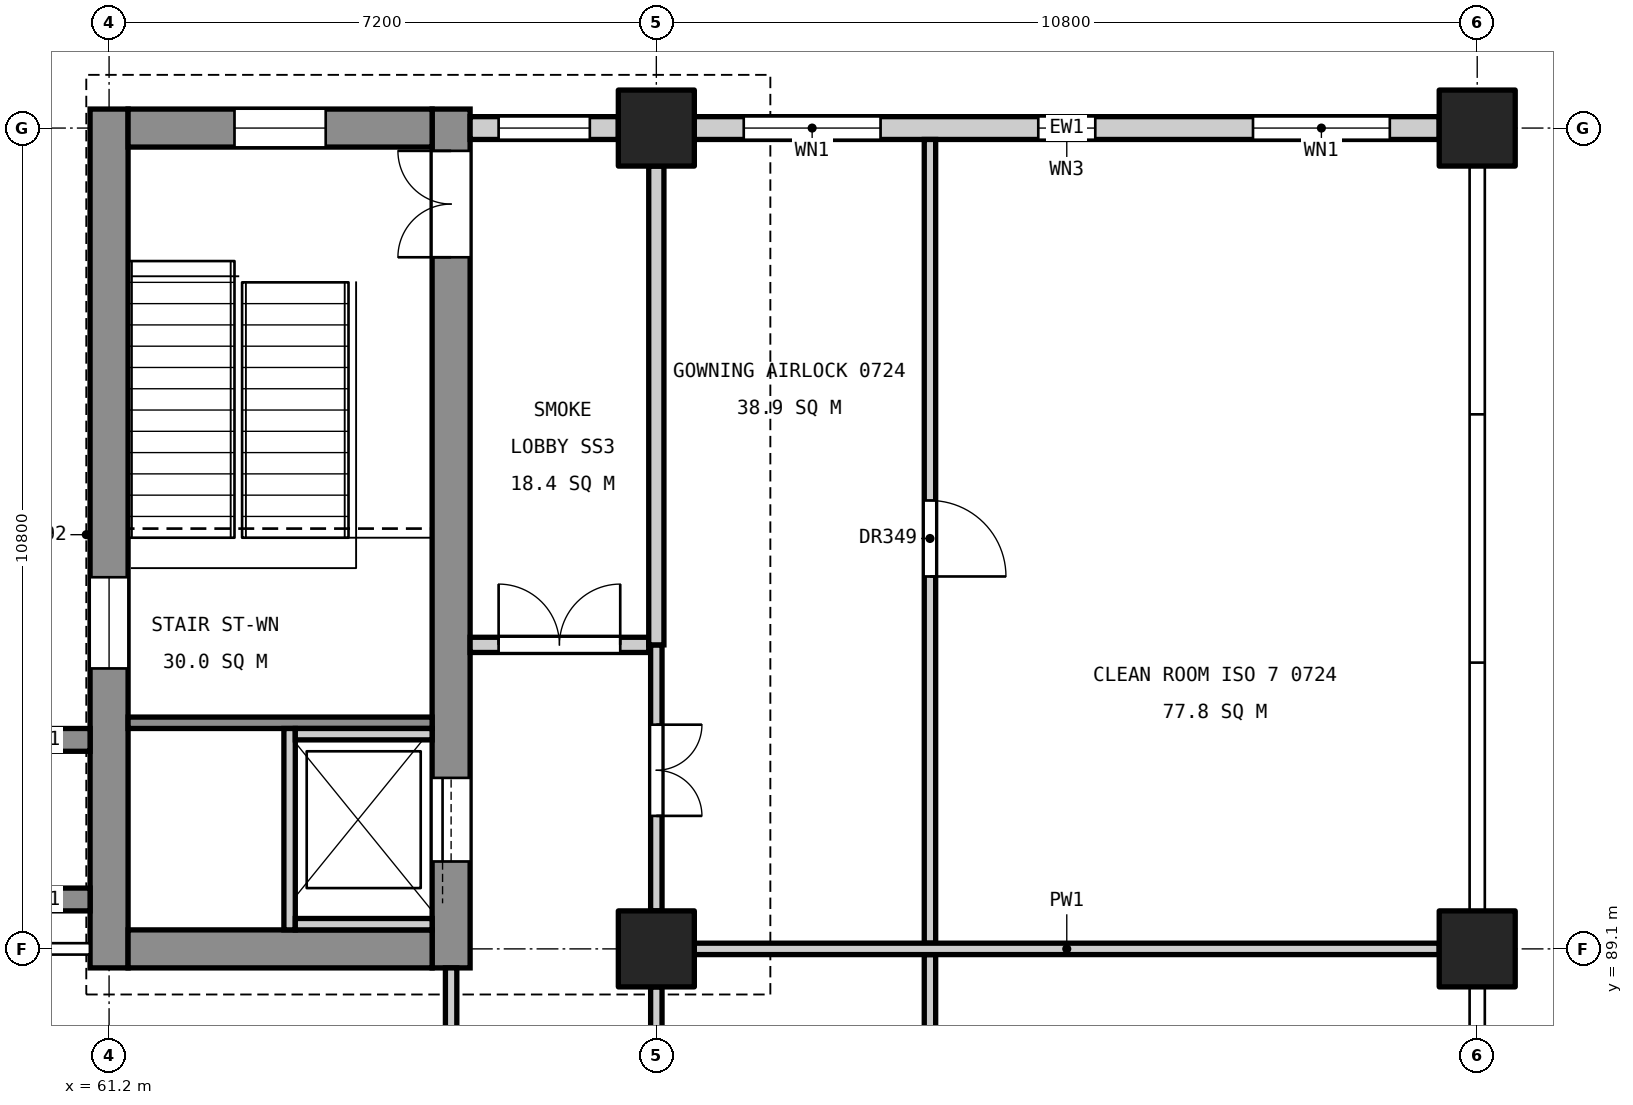
"""IFC4 building model, lengths in metres.
Left out: names, types, materials, properties, quantities, classifications, styles, units other than length and angle.
Written with IfcOpenShell. Run it as: python <this file> out.ifc"""

import sys

from ifc_helpers import new_model, si_unit, direction, frame, frame_2d, origin, origin_2d, place, context, subcontext, project, spatial, rectangle, extrude, element, fill, save


model = new_model("IFC4")
c1 = context("Model", 3, precision=1e-05, world=origin(), true_north=direction((0.0, 1.0)))
c2 = subcontext(c1, "Body", "Model", "MODEL_VIEW")
j1 = project(units=[si_unit("LENGTHUNIT", "METRE"), si_unit("PLANEANGLEUNIT", "RADIAN")], contexts=[c1])
p1 = place(None, origin())
s1 = spatial("IfcSite", under=j1, at=p1, CompositionType="ELEMENT")
p2 = place(p1, origin())
s2 = spatial("IfcBuilding", under=s1, at=p2, CompositionType="ELEMENT")
p3 = place(p2, frame((0.0, 0.0, 36.6)))
s3 = spatial("IfcBuildingStorey", under=s2, at=p3, CompositionType="ELEMENT", Elevation=36.6)
for number, where, z_axis, x_axis in (
    (1, (68.4, 89.1, 0.0), (0.0, 0.0, 1.0), (1.0, 0.0, 0.0)),
    (2, (68.4, 99.9, 0.0), (0.0, 0.0, 1.0), (1.0, 0.0, 0.0)),
    (3, (79.2, 89.1, 0.0), (0.0, 0.0, 1.0), (1.0, 0.0, 0.0)),
    (4, (79.2, 99.9, 0.0), (0.0, 0.0, 1.0), (1.0, 0.0, 0.0)),
):
    element("IfcColumn", number, at=place(p3, frame(where, z_axis=z_axis, x_axis=x_axis)), inside=s3, PredefinedType="COLUMN", context=c2, shape_type="SweptSolid", body=[
        extrude(rectangle(XDim=1.0, YDim=1.0, at=origin_2d()), origin(), (0.0, 0.0, 1.0), 4.8),
    ])
p4 = place(p3, frame((61.2, 88.85, 0.0), z_axis=(0.0, 0.0, 1.0), x_axis=(0.0, 1.0, 0.0)))
e5 = element("IfcWall", 5, at=p4, inside=s3, PredefinedType="SHEAR", context=c2, shape_type="SweptSolid", body=[
    extrude(rectangle(XDim=11.3, YDim=0.5, at=frame_2d((5.65, 0.0))), origin(), (0.0, 0.0, 1.0), 4.55),
])
p5 = place(p4, frame((3.94, 0.0, 3.4)))
e6 = element("IfcOpeningElement", 6, at=p5, cuts=e5, PredefinedType="OPENING", context=c2, shape_type="SweptSolid", body=[
    extrude(rectangle(XDim=1.2, YDim=0.9, at=frame_2d((0.6, 0.45))), frame((0.0, 0.26, 0.0), z_axis=(0.0, -1.0, 0.0), x_axis=(1.0, 0.0, 0.0)), (0.0, 0.0, 1.0), 0.52),
])
p6 = place(p3, frame((65.7, 88.85, 0.0), z_axis=(0.0, 0.0, 1.0), x_axis=(0.0, 1.0, 0.0)))
e7 = element("IfcWall", 7, at=p6, inside=s3, PredefinedType="SHEAR", context=c2, shape_type="SweptSolid", body=[
    extrude(rectangle(XDim=11.3, YDim=0.5, at=frame_2d((5.65, 0.0))), origin(), (0.0, 0.0, 1.0), 4.55),
])
p7 = place(p6, frame((9.35, 0.0, 0.0)))
e8 = element("IfcOpeningElement", 8, at=p7, cuts=e7, PredefinedType="OPENING", context=c2, shape_type="SweptSolid", body=[
    extrude(rectangle(XDim=1.4, YDim=2.1, at=frame_2d((0.7, 1.05))), frame((0.0, 0.26, 0.0), z_axis=(0.0, -1.0, 0.0), x_axis=(1.0, 0.0, 0.0)), (0.0, 0.0, 1.0), 0.52),
])
p8 = place(p6, frame((1.4, 0.0, 0.0)))
e9 = element("IfcOpeningElement", 9, at=p8, cuts=e7, PredefinedType="OPENING", context=c2, shape_type="SweptSolid", body=[
    extrude(rectangle(XDim=1.1, YDim=2.1, at=frame_2d((0.55, 1.05))), frame((0.0, 0.26, 0.0), z_axis=(0.0, -1.0, 0.0), x_axis=(1.0, 0.0, 0.0)), (0.0, 0.0, 1.0), 0.52),
])
p9 = place(p3, frame((61.45, 89.1, 0.0), z_axis=(0.0, 0.0, 1.0), x_axis=(1.0, 0.0, 0.0)))
e10 = element("IfcWall", 10, at=p9, inside=s3, PredefinedType="SHEAR", context=c2, shape_type="SweptSolid", body=[
    extrude(rectangle(XDim=4.0, YDim=0.5, at=frame_2d((2.0, 0.0))), origin(), (0.0, 0.0, 1.0), 4.55),
])
p10 = place(p3, frame((61.45, 99.9, 0.0), z_axis=(0.0, 0.0, 1.0), x_axis=(1.0, 0.0, 0.0)))
e11 = element("IfcWall", 11, at=p10, inside=s3, PredefinedType="SHEAR", context=c2, shape_type="SweptSolid", body=[
    extrude(rectangle(XDim=4.0, YDim=0.5, at=frame_2d((2.0, 0.0))), origin(), (0.0, 0.0, 1.0), 4.55),
])
p11 = place(p10, frame((1.4, 0.0, 3.4)))
e12 = element("IfcOpeningElement", 12, at=p11, cuts=e11, PredefinedType="OPENING", context=c2, shape_type="SweptSolid", body=[
    extrude(rectangle(XDim=1.2, YDim=0.9, at=frame_2d((0.6, 0.45))), frame((0.0, 0.26, 0.0), z_axis=(0.0, -1.0, 0.0), x_axis=(1.0, 0.0, 0.0)), (0.0, 0.0, 1.0), 0.52),
])
for number, where, z_axis, x_axis in (
    (13, (60.95, 89.75, 0.0), (0.0, 0.0, 1.0), (-1.0, 0.0, 0.0)),
    (14, (60.95, 91.85, 0.0), (0.0, 0.0, 1.0), (-1.0, 0.0, 0.0)),
):
    element("IfcWall", number, at=place(p3, frame(where, z_axis=z_axis, x_axis=x_axis)), inside=s3, PredefinedType="SHEAR", context=c2, shape_type="SweptSolid", body=[
        extrude(rectangle(XDim=1.25, YDim=0.3, at=frame_2d((0.625, 0.0))), origin(), (0.0, 0.0, 1.0), 4.8),
    ])
p12 = place(p3, frame((61.45, 92.075, 0.0), z_axis=(0.0, 0.0, 1.0), x_axis=(1.0, 0.0, 0.0)))
e15 = element("IfcWall", 15, at=p12, inside=s3, PredefinedType="SOLIDWALL", context=c2, shape_type="SweptSolid", body=[
    extrude(rectangle(XDim=4.0, YDim=0.15, at=frame_2d((2.0, 0.0))), origin(), (0.0, 0.0, 1.0), 4.55),
])
p13 = place(p3, frame((63.575, 92.0, 0.0), z_axis=(0.0, 0.0, 1.0), x_axis=(0.0, -1.0, 0.0)))
e16 = element("IfcWall", 16, at=p13, inside=s3, PredefinedType="SOLIDWALL", context=c2, shape_type="SweptSolid", body=[
    extrude(rectangle(XDim=2.65, YDim=0.15, at=frame_2d((1.325, 0.0))), origin(), (0.0, 0.0, 1.0), 4.8),
])
for number, where, z_axis, x_axis in (
    (17, (63.65, 91.925, 0.0), (0.0, 0.0, 1.0), (1.0, 0.0, 0.0)),
    (18, (63.65, 89.425, 0.0), (0.0, 0.0, 1.0), (1.0, 0.0, 0.0)),
):
    element("IfcWall", number, at=place(p3, frame(where, z_axis=z_axis, x_axis=x_axis)), inside=s3, PredefinedType="SOLIDWALL", context=c2, shape_type="SweptSolid", body=[
        extrude(rectangle(XDim=1.8, YDim=0.15, at=frame_2d((0.9, 0.0))), origin(), (0.0, 0.0, 1.0), 4.8),
    ])
p14 = place(p3, frame((65.95, 99.9, 0.0), z_axis=(0.0, 0.0, 1.0), x_axis=(1.0, 0.0, 0.0)))
e19 = element("IfcWall", 19, at=p14, inside=s3, PredefinedType="STANDARD", context=c2, shape_type="SweptSolid", body=[
    extrude(rectangle(XDim=1.95, YDim=0.3, at=frame_2d((0.975, 0.0))), origin(), (0.0, 0.0, 1.0), 3.85),
])
p15 = place(p14, frame((0.375, 0.0, 0.9)))
e20 = element("IfcOpeningElement", 20, at=p15, cuts=e19, PredefinedType="OPENING", context=c2, shape_type="SweptSolid", body=[
    extrude(rectangle(XDim=1.2, YDim=2.4, at=frame_2d((0.6, 1.2))), frame((0.0, 0.16, 0.0), z_axis=(0.0, -1.0, 0.0), x_axis=(1.0, 0.0, 0.0)), (0.0, 0.0, 1.0), 0.32),
])
p16 = place(p3, frame((68.9, 99.9, 0.0), z_axis=(0.0, 0.0, 1.0), x_axis=(1.0, 0.0, 0.0)))
e21 = element("IfcWall", 21, at=p16, inside=s3, PredefinedType="STANDARD", context=c2, shape_type="SweptSolid", body=[
    extrude(rectangle(XDim=9.8, YDim=0.3, at=frame_2d((4.9, 0.0))), origin(), (0.0, 0.0, 1.0), 3.85),
])
p17 = place(p16, frame((0.65, 0.0, 0.9)))
e22 = element("IfcOpeningElement", 22, at=p17, cuts=e21, PredefinedType="OPENING", context=c2, shape_type="SweptSolid", body=[
    extrude(rectangle(XDim=1.8, YDim=2.4, at=frame_2d((0.9, 1.2))), frame((0.0, 0.16, 0.0), z_axis=(0.0, -1.0, 0.0), x_axis=(1.0, 0.0, 0.0)), (0.0, 0.0, 1.0), 0.32),
])
p18 = place(p16, frame((4.525, 0.0, 0.8)))
e23 = element("IfcOpeningElement", 23, at=p18, cuts=e21, PredefinedType="OPENING", context=c2, shape_type="SweptSolid", body=[
    extrude(rectangle(XDim=0.75, YDim=1.2, at=frame_2d((0.375, 0.6))), frame((0.0, 0.16, 0.0), z_axis=(0.0, -1.0, 0.0), x_axis=(1.0, 0.0, 0.0)), (0.0, 0.0, 1.0), 0.32),
])
p19 = place(p16, frame((7.35, 0.0, 0.9)))
e24 = element("IfcOpeningElement", 24, at=p19, cuts=e21, PredefinedType="OPENING", context=c2, shape_type="SweptSolid", body=[
    extrude(rectangle(XDim=1.8, YDim=2.4, at=frame_2d((0.9, 1.2))), frame((0.0, 0.16, 0.0), z_axis=(0.0, -1.0, 0.0), x_axis=(1.0, 0.0, 0.0)), (0.0, 0.0, 1.0), 0.32),
])
p20 = place(p3, frame((65.7, 78.45, 0.0), z_axis=(0.0, 0.0, 1.0), x_axis=(0.0, 1.0, 0.0)))
e25 = element("IfcWall", 25, at=p20, inside=s3, PredefinedType="PARTITIONING", context=c2, shape_type="SweptSolid", body=[
    extrude(rectangle(XDim=10.4, YDim=0.15, at=frame_2d((5.2, 0.0))), origin(), (0.0, 0.0, 1.0), 3.55),
])
p21 = place(p20, frame((4.75, 0.0, 0.0)))
e26 = element("IfcOpeningElement", 26, at=p21, cuts=e25, PredefinedType="OPENING", context=c2, shape_type="SweptSolid", body=[
    extrude(rectangle(XDim=1.0, YDim=2.1, at=frame_2d((0.5, 1.05))), frame((0.0, 0.085, 0.0), z_axis=(0.0, -1.0, 0.0), x_axis=(1.0, 0.0, 0.0)), (0.0, 0.0, 1.0), 0.17),
])
p22 = place(p3, frame((65.95, 93.1, 0.0), z_axis=(0.0, 0.0, 1.0), x_axis=(1.0, 0.0, 0.0)))
e27 = element("IfcWall", 27, at=p22, inside=s3, PredefinedType="PARTITIONING", context=c2, shape_type="SweptSolid", body=[
    extrude(rectangle(XDim=2.35, YDim=0.2, at=frame_2d((1.175, 0.0))), origin(), (0.0, 0.0, 1.0), 3.55),
])
p23 = place(p22, frame((0.375, 0.0, 0.0)))
e28 = element("IfcOpeningElement", 28, at=p23, cuts=e27, PredefinedType="OPENING", context=c2, shape_type="SweptSolid", body=[
    extrude(rectangle(XDim=1.6, YDim=2.1, at=frame_2d((0.8, 1.05))), frame((0.0, 0.11, 0.0), z_axis=(0.0, -1.0, 0.0), x_axis=(1.0, 0.0, 0.0)), (0.0, 0.0, 1.0), 0.22),
])
p24 = place(p3, frame((68.4, 78.8, 0.0), z_axis=(0.0, 0.0, 1.0), x_axis=(0.0, 1.0, 0.0)))
e29 = element("IfcWall", 29, at=p24, inside=s3, PredefinedType="PARTITIONING", context=c2, shape_type="SweptSolid", body=[
    extrude(rectangle(XDim=9.8, YDim=0.15, at=frame_2d((4.9, 0.0))), origin(), (0.0, 0.0, 1.0), 3.55),
])
p25 = place(p24, frame((1.05, 0.0, 0.0)))
e30 = element("IfcOpeningElement", 30, at=p25, cuts=e29, PredefinedType="OPENING", context=c2, shape_type="SweptSolid", body=[
    extrude(rectangle(XDim=1.2, YDim=2.1, at=frame_2d((0.6, 1.05))), frame((0.0, 0.085, 0.0), z_axis=(0.0, -1.0, 0.0), x_axis=(1.0, 0.0, 0.0)), (0.0, 0.0, 1.0), 0.17),
])
p26 = place(p24, frame((5.95, 0.0, 0.0)))
e31 = element("IfcOpeningElement", 31, at=p26, cuts=e29, PredefinedType="OPENING", context=c2, shape_type="SweptSolid", body=[
    extrude(rectangle(XDim=1.2, YDim=2.1, at=frame_2d((0.6, 1.05))), frame((0.0, 0.085, 0.0), z_axis=(0.0, -1.0, 0.0), x_axis=(1.0, 0.0, 0.0)), (0.0, 0.0, 1.0), 0.17),
])
p27 = place(p3, frame((68.4, 89.6, 0.0), z_axis=(0.0, 0.0, 1.0), x_axis=(0.0, 1.0, 0.0)))
e32 = element("IfcWall", 32, at=p27, inside=s3, PredefinedType="PARTITIONING", context=c2, shape_type="SweptSolid", body=[
    extrude(rectangle(XDim=3.5, YDim=0.15, at=frame_2d((1.75, 0.0))), origin(), (0.0, 0.0, 1.0), 3.55),
])
p28 = place(p27, frame((1.25, 0.0, 0.0)))
e33 = element("IfcOpeningElement", 33, at=p28, cuts=e32, PredefinedType="OPENING", context=c2, shape_type="SweptSolid", body=[
    extrude(rectangle(XDim=1.2, YDim=2.1, at=frame_2d((0.6, 1.05))), frame((0.0, 0.085, 0.0), z_axis=(0.0, -1.0, 0.0), x_axis=(1.0, 0.0, 0.0)), (0.0, 0.0, 1.0), 0.17),
])
p29 = place(p3, frame((68.4, 93.1, 0.0), z_axis=(0.0, 0.0, 1.0), x_axis=(0.0, 1.0, 0.0)))
e34 = element("IfcWall", 34, at=p29, inside=s3, PredefinedType="PARTITIONING", context=c2, shape_type="SweptSolid", body=[
    extrude(rectangle(XDim=6.3, YDim=0.2, at=frame_2d((3.15, 0.0))), origin(), (0.0, 0.0, 1.0), 3.55),
])
p30 = place(p3, frame((72.0, 81.975, 0.0), z_axis=(0.0, 0.0, 1.0), x_axis=(0.0, 1.0, 0.0)))
e35 = element("IfcWall", 35, at=p30, inside=s3, PredefinedType="PARTITIONING", context=c2, shape_type="SweptSolid", body=[
    extrude(rectangle(XDim=7.05, YDim=0.15, at=frame_2d((3.525, 0.0))), origin(), (0.0, 0.0, 1.0), 3.55),
])
p31 = place(p30, frame((3.025, 0.0, 0.0)))
e36 = element("IfcOpeningElement", 36, at=p31, cuts=e35, PredefinedType="OPENING", context=c2, shape_type="SweptSolid", body=[
    extrude(rectangle(XDim=1.0, YDim=2.1, at=frame_2d((0.5, 1.05))), frame((0.0, 0.085, 0.0), z_axis=(0.0, -1.0, 0.0), x_axis=(1.0, 0.0, 0.0)), (0.0, 0.0, 1.0), 0.17),
])
p32 = place(p3, frame((72.0, 89.175, 0.0), z_axis=(0.0, 0.0, 1.0), x_axis=(0.0, 1.0, 0.0)))
e37 = element("IfcWall", 37, at=p32, inside=s3, PredefinedType="PARTITIONING", context=c2, shape_type="SweptSolid", body=[
    extrude(rectangle(XDim=10.575, YDim=0.15, at=frame_2d((5.288, 0.0))), origin(), (0.0, 0.0, 1.0), 3.55),
])
p33 = place(p32, frame((4.825, 0.0, 0.0)))
e38 = element("IfcOpeningElement", 38, at=p33, cuts=e37, PredefinedType="OPENING", context=c2, shape_type="SweptSolid", body=[
    extrude(rectangle(XDim=1.0, YDim=2.1, at=frame_2d((0.5, 1.05))), frame((0.0, 0.085, 0.0), z_axis=(0.0, -1.0, 0.0), x_axis=(1.0, 0.0, 0.0)), (0.0, 0.0, 1.0), 0.17),
])
p34 = place(p3, frame((68.9, 89.1, 0.0), z_axis=(0.0, 0.0, 1.0), x_axis=(1.0, 0.0, 0.0)))
e39 = element("IfcWall", 39, at=p34, inside=s3, PredefinedType="PARTITIONING", context=c2, shape_type="SweptSolid", body=[
    extrude(rectangle(XDim=9.8, YDim=0.15, at=frame_2d((4.9, 0.0))), origin(), (0.0, 0.0, 1.0), 3.85),
])
p35 = place(p7, origin())
e40 = element("IfcDoor", 40, at=p35, inside=s3, OperationType="DOUBLE_DOOR_SINGLE_SWING", PredefinedType="DOOR", context=c2, shape_type="SweptSolid", body=[
    extrude(rectangle(XDim=1.4, YDim=2.1, at=frame_2d((0.7, 1.05))), frame((0.0, 0.025, 0.0), z_axis=(0.0, -1.0, 0.0), x_axis=(1.0, 0.0, 0.0)), (0.0, 0.0, 1.0), 0.05),
])
fill(e8, e40)
p36 = place(p8, origin())
e41 = element("IfcDoor", 41, at=p36, inside=s3, OperationType="SLIDING_TO_LEFT", PredefinedType="DOOR", context=c2, shape_type="SweptSolid", body=[
    extrude(rectangle(XDim=1.1, YDim=2.1, at=frame_2d((0.55, 1.05))), frame((0.0, 0.025, 0.0), z_axis=(0.0, -1.0, 0.0), x_axis=(1.0, 0.0, 0.0)), (0.0, 0.0, 1.0), 0.05),
])
fill(e9, e41)
p37 = place(p15, origin())
e42 = element("IfcWindow", 42, at=p37, inside=s3, PartitioningType="SINGLE_PANEL", PredefinedType="WINDOW", context=c2, shape_type="SweptSolid", body=[
    extrude(rectangle(XDim=1.2, YDim=2.4, at=frame_2d((0.6, 1.2))), frame((0.0, 0.03, 0.0), z_axis=(0.0, -1.0, 0.0), x_axis=(1.0, 0.0, 0.0)), (0.0, 0.0, 1.0), 0.06),
])
fill(e20, e42)
p38 = place(p17, origin())
e43 = element("IfcWindow", 43, at=p38, inside=s3, PartitioningType="SINGLE_PANEL", PredefinedType="WINDOW", context=c2, shape_type="SweptSolid", body=[
    extrude(rectangle(XDim=1.8, YDim=2.4, at=frame_2d((0.9, 1.2))), frame((0.0, 0.03, 0.0), z_axis=(0.0, -1.0, 0.0), x_axis=(1.0, 0.0, 0.0)), (0.0, 0.0, 1.0), 0.06),
])
fill(e22, e43)
p39 = place(p18, origin())
e44 = element("IfcWindow", 44, at=p39, inside=s3, PartitioningType="SINGLE_PANEL", PredefinedType="WINDOW", context=c2, shape_type="SweptSolid", body=[
    extrude(rectangle(XDim=0.75, YDim=1.2, at=frame_2d((0.375, 0.6))), frame((0.0, 0.03, 0.0), z_axis=(0.0, -1.0, 0.0), x_axis=(1.0, 0.0, 0.0)), (0.0, 0.0, 1.0), 0.06),
])
fill(e23, e44)
p40 = place(p19, origin())
e45 = element("IfcWindow", 45, at=p40, inside=s3, PartitioningType="SINGLE_PANEL", PredefinedType="WINDOW", context=c2, shape_type="SweptSolid", body=[
    extrude(rectangle(XDim=1.8, YDim=2.4, at=frame_2d((0.9, 1.2))), frame((0.0, 0.03, 0.0), z_axis=(0.0, -1.0, 0.0), x_axis=(1.0, 0.0, 0.0)), (0.0, 0.0, 1.0), 0.06),
])
fill(e24, e45)
p41 = place(p5, origin())
e46 = element("IfcWindow", 46, at=p41, inside=s3, PartitioningType="SINGLE_PANEL", PredefinedType="WINDOW", context=c2, shape_type="SweptSolid", body=[
    extrude(rectangle(XDim=1.2, YDim=0.9, at=frame_2d((0.6, 0.45))), frame((0.0, 0.03, 0.0), z_axis=(0.0, -1.0, 0.0), x_axis=(1.0, 0.0, 0.0)), (0.0, 0.0, 1.0), 0.06),
])
fill(e6, e46)
p42 = place(p11, origin())
e47 = element("IfcWindow", 47, at=p42, inside=s3, PartitioningType="SINGLE_PANEL", PredefinedType="WINDOW", context=c2, shape_type="SweptSolid", body=[
    extrude(rectangle(XDim=1.2, YDim=0.9, at=frame_2d((0.6, 0.45))), frame((0.0, 0.03, 0.0), z_axis=(0.0, -1.0, 0.0), x_axis=(1.0, 0.0, 0.0)), (0.0, 0.0, 1.0), 0.06),
])
fill(e12, e47)
p43 = place(p33, frame((1.0, 0.0, 0.0), z_axis=(0.0, 0.0, 1.0), x_axis=(-1.0, 0.0, 0.0)))
e48 = element("IfcDoor", 48, at=p43, inside=s3, OperationType="SINGLE_SWING_RIGHT", PredefinedType="DOOR", context=c2, shape_type="SweptSolid", body=[
    extrude(rectangle(XDim=1.0, YDim=2.1, at=frame_2d((0.5, 1.05))), frame((0.0, 0.025, 0.0), z_axis=(0.0, -1.0, 0.0), x_axis=(1.0, 0.0, 0.0)), (0.0, 0.0, 1.0), 0.05),
])
fill(e38, e48)
p44 = place(p28, frame((1.2, 0.0, 0.0), z_axis=(0.0, 0.0, 1.0), x_axis=(-1.0, 0.0, 0.0)))
e49 = element("IfcDoor", 49, at=p44, inside=s3, OperationType="DOUBLE_DOOR_SINGLE_SWING", PredefinedType="DOOR", context=c2, shape_type="SweptSolid", body=[
    extrude(rectangle(XDim=1.2, YDim=2.1, at=frame_2d((0.6, 1.05))), frame((0.0, 0.025, 0.0), z_axis=(0.0, -1.0, 0.0), x_axis=(1.0, 0.0, 0.0)), (0.0, 0.0, 1.0), 0.05),
])
fill(e33, e49)
p45 = place(p23, origin())
e50 = element("IfcDoor", 50, at=p45, inside=s3, OperationType="DOUBLE_DOOR_SINGLE_SWING", PredefinedType="DOOR", context=c2, shape_type="SweptSolid", body=[
    extrude(rectangle(XDim=1.6, YDim=2.1, at=frame_2d((0.8, 1.05))), frame((0.0, 0.025, 0.0), z_axis=(0.0, -1.0, 0.0), x_axis=(1.0, 0.0, 0.0)), (0.0, 0.0, 1.0), 0.05),
])
fill(e28, e50)
save(model, sys.argv[1])
